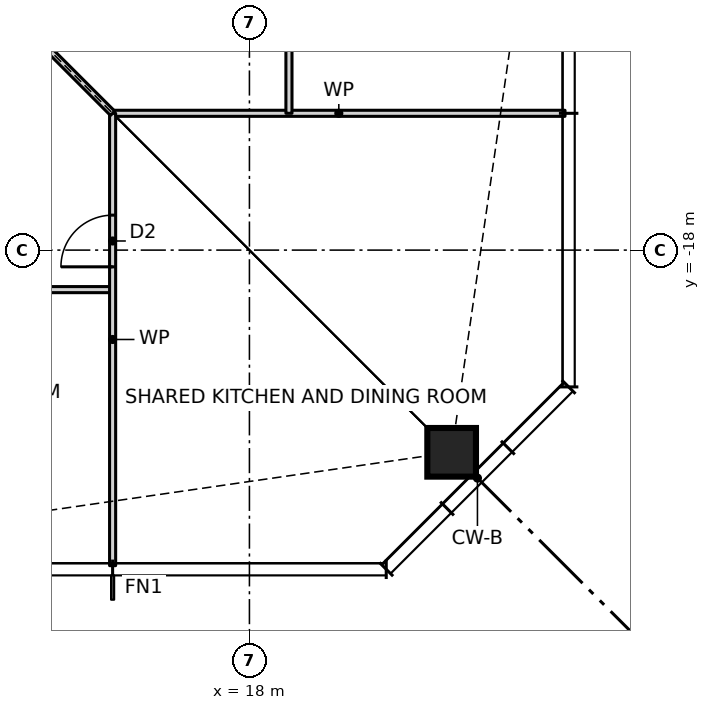
"""IFC4 building model, lengths in metres.
Left out: names, types, materials, properties, quantities, classifications, styles, units other than length and angle.
Written with IfcOpenShell. Run it as: python <this file> out.ifc"""

import sys

from ifc_helpers import new_model, si_unit, direction, frame, frame_2d, origin, origin_2d, place, context, subcontext, project, spatial, rectangle, hollow_rectangle, extrude, element, fill, save


model = new_model("IFC4")
c1 = context("Model", 3, precision=1e-05, world=origin(), true_north=direction((0.0, 1.0)))
c2 = subcontext(c1, "Body", "Model", "MODEL_VIEW")
j1 = project(units=[si_unit("LENGTHUNIT", "METRE"), si_unit("PLANEANGLEUNIT", "RADIAN")], contexts=[c1])
p1 = place(None, origin())
s1 = spatial("IfcSite", under=j1, at=p1, CompositionType="ELEMENT")
p2 = place(p1, origin())
s2 = spatial("IfcBuilding", under=s1, at=p2, CompositionType="ELEMENT")
p3 = place(p2, frame((0.0, 0.0, 67.5)))
s3 = spatial("IfcBuildingStorey", under=s2, at=p3, CompositionType="ELEMENT", Elevation=67.5)
p4 = place(p3, frame((21.326, -21.326, 0.0), z_axis=(0.0, 0.0, 1.0), x_axis=(1.0, 0.0, 0.0)))
e1 = element("IfcColumn", 1, at=p4, inside=s3, PredefinedType="COLUMN", context=c2, shape_type="SweptSolid", body=[
    extrude(hollow_rectangle(XDim=0.8, YDim=0.8, WallThickness=0.09, at=origin_2d()), origin(), (0.0, 0.0, 1.0), 3.5),
])
p5 = place(p3, frame((-15.75, -18.65, 0.0), z_axis=(0.0, 0.0, 1.0), x_axis=(1.0, 0.0, 0.0)))
e2 = element("IfcWall", 2, at=p5, inside=s3, PredefinedType="PARTITIONING", context=c2, shape_type="SweptSolid", body=[
    extrude(rectangle(XDim=31.5, YDim=0.1, at=frame_2d((15.75, 0.0))), origin(), (0.0, 0.0, 1.0), 3.27),
])
p6 = place(p5, frame((1.8, 0.0, 0.0)))
e3 = element("IfcOpeningElement", 3, at=p6, cuts=e2, PredefinedType="OPENING", context=c2, shape_type="SweptSolid", body=[
    extrude(rectangle(XDim=0.9, YDim=2.1, at=frame_2d((0.45, 1.05))), frame((0.0, 0.06, 0.0), z_axis=(0.0, -1.0, 0.0), x_axis=(1.0, 0.0, 0.0)), (0.0, 0.0, 1.0), 0.12),
])
p7 = place(p5, frame((6.3, 0.0, 0.0)))
e4 = element("IfcOpeningElement", 4, at=p7, cuts=e2, PredefinedType="OPENING", context=c2, shape_type="SweptSolid", body=[
    extrude(rectangle(XDim=0.9, YDim=2.1, at=frame_2d((0.45, 1.05))), frame((0.0, 0.06, 0.0), z_axis=(0.0, -1.0, 0.0), x_axis=(1.0, 0.0, 0.0)), (0.0, 0.0, 1.0), 0.12),
])
p8 = place(p5, frame((10.8, 0.0, 0.0)))
e5 = element("IfcOpeningElement", 5, at=p8, cuts=e2, PredefinedType="OPENING", context=c2, shape_type="SweptSolid", body=[
    extrude(rectangle(XDim=0.9, YDim=2.1, at=frame_2d((0.45, 1.05))), frame((0.0, 0.06, 0.0), z_axis=(0.0, -1.0, 0.0), x_axis=(1.0, 0.0, 0.0)), (0.0, 0.0, 1.0), 0.12),
])
p9 = place(p5, frame((15.3, 0.0, 0.0)))
e6 = element("IfcOpeningElement", 6, at=p9, cuts=e2, PredefinedType="OPENING", context=c2, shape_type="SweptSolid", body=[
    extrude(rectangle(XDim=0.9, YDim=2.1, at=frame_2d((0.45, 1.05))), frame((0.0, 0.06, 0.0), z_axis=(0.0, -1.0, 0.0), x_axis=(1.0, 0.0, 0.0)), (0.0, 0.0, 1.0), 0.12),
])
p10 = place(p5, frame((19.8, 0.0, 0.0)))
e7 = element("IfcOpeningElement", 7, at=p10, cuts=e2, PredefinedType="OPENING", context=c2, shape_type="SweptSolid", body=[
    extrude(rectangle(XDim=0.9, YDim=2.1, at=frame_2d((0.45, 1.05))), frame((0.0, 0.06, 0.0), z_axis=(0.0, -1.0, 0.0), x_axis=(1.0, 0.0, 0.0)), (0.0, 0.0, 1.0), 0.12),
])
p11 = place(p5, frame((24.3, 0.0, 0.0)))
e8 = element("IfcOpeningElement", 8, at=p11, cuts=e2, PredefinedType="OPENING", context=c2, shape_type="SweptSolid", body=[
    extrude(rectangle(XDim=0.9, YDim=2.1, at=frame_2d((0.45, 1.05))), frame((0.0, 0.06, 0.0), z_axis=(0.0, -1.0, 0.0), x_axis=(1.0, 0.0, 0.0)), (0.0, 0.0, 1.0), 0.12),
])
p12 = place(p5, frame((28.8, 0.0, 0.0)))
e9 = element("IfcOpeningElement", 9, at=p12, cuts=e2, PredefinedType="OPENING", context=c2, shape_type="SweptSolid", body=[
    extrude(rectangle(XDim=0.9, YDim=2.1, at=frame_2d((0.45, 1.05))), frame((0.0, 0.06, 0.0), z_axis=(0.0, -1.0, 0.0), x_axis=(1.0, 0.0, 0.0)), (0.0, 0.0, 1.0), 0.12),
])
p13 = place(p3, frame((15.75, -15.75, 0.0), z_axis=(0.0, 0.0, 1.0), x_axis=(1.0, 0.0, 0.0)))
e10 = element("IfcWall", 10, at=p13, inside=s3, PredefinedType="PARTITIONING", context=c2, shape_type="SweptSolid", body=[
    extrude(rectangle(XDim=7.44, YDim=0.1, at=frame_2d((3.72, 0.0))), origin(), (0.0, 0.0, 1.0), 3.27),
])
p14 = place(p3, frame((18.65, -15.75, 0.0), z_axis=(0.0, 0.0, 1.0), x_axis=(0.0, 1.0, 0.0)))
e11 = element("IfcWall", 11, at=p14, inside=s3, PredefinedType="PARTITIONING", context=c2, shape_type="SweptSolid", body=[
    extrude(rectangle(XDim=27.0, YDim=0.1, at=frame_2d((13.5, 0.0))), origin(), (0.0, 0.0, 1.0), 3.27),
])
p15 = place(p14, frame((1.8, 0.0, 0.0)))
e12 = element("IfcOpeningElement", 12, at=p15, cuts=e11, PredefinedType="OPENING", context=c2, shape_type="SweptSolid", body=[
    extrude(rectangle(XDim=0.9, YDim=2.1, at=frame_2d((0.45, 1.05))), frame((0.0, 0.06, 0.0), z_axis=(0.0, -1.0, 0.0), x_axis=(1.0, 0.0, 0.0)), (0.0, 0.0, 1.0), 0.12),
])
p16 = place(p14, frame((6.3, 0.0, 0.0)))
e13 = element("IfcOpeningElement", 13, at=p16, cuts=e11, PredefinedType="OPENING", context=c2, shape_type="SweptSolid", body=[
    extrude(rectangle(XDim=0.9, YDim=2.1, at=frame_2d((0.45, 1.05))), frame((0.0, 0.06, 0.0), z_axis=(0.0, -1.0, 0.0), x_axis=(1.0, 0.0, 0.0)), (0.0, 0.0, 1.0), 0.12),
])
p17 = place(p14, frame((10.8, 0.0, 0.0)))
e14 = element("IfcOpeningElement", 14, at=p17, cuts=e11, PredefinedType="OPENING", context=c2, shape_type="SweptSolid", body=[
    extrude(rectangle(XDim=0.9, YDim=2.1, at=frame_2d((0.45, 1.05))), frame((0.0, 0.06, 0.0), z_axis=(0.0, -1.0, 0.0), x_axis=(1.0, 0.0, 0.0)), (0.0, 0.0, 1.0), 0.12),
])
p18 = place(p14, frame((15.3, 0.0, 0.0)))
e15 = element("IfcOpeningElement", 15, at=p18, cuts=e11, PredefinedType="OPENING", context=c2, shape_type="SweptSolid", body=[
    extrude(rectangle(XDim=0.9, YDim=2.1, at=frame_2d((0.45, 1.05))), frame((0.0, 0.06, 0.0), z_axis=(0.0, -1.0, 0.0), x_axis=(1.0, 0.0, 0.0)), (0.0, 0.0, 1.0), 0.12),
])
p19 = place(p14, frame((19.8, 0.0, 0.0)))
e16 = element("IfcOpeningElement", 16, at=p19, cuts=e11, PredefinedType="OPENING", context=c2, shape_type="SweptSolid", body=[
    extrude(rectangle(XDim=0.9, YDim=2.1, at=frame_2d((0.45, 1.05))), frame((0.0, 0.06, 0.0), z_axis=(0.0, -1.0, 0.0), x_axis=(1.0, 0.0, 0.0)), (0.0, 0.0, 1.0), 0.12),
])
p20 = place(p14, frame((24.3, 0.0, 0.0)))
e17 = element("IfcOpeningElement", 17, at=p20, cuts=e11, PredefinedType="OPENING", context=c2, shape_type="SweptSolid", body=[
    extrude(rectangle(XDim=0.9, YDim=2.1, at=frame_2d((0.45, 1.05))), frame((0.0, 0.06, 0.0), z_axis=(0.0, -1.0, 0.0), x_axis=(1.0, 0.0, 0.0)), (0.0, 0.0, 1.0), 0.12),
])
p21 = place(p3, frame((15.75, -23.19, 0.0), z_axis=(0.0, 0.0, 1.0), x_axis=(0.0, 1.0, 0.0)))
e18 = element("IfcWall", 18, at=p21, inside=s3, PredefinedType="PARTITIONING", context=c2, shape_type="SweptSolid", body=[
    extrude(rectangle(XDim=7.44, YDim=0.1, at=frame_2d((3.72, 0.0))), origin(), (0.0, 0.0, 1.0), 3.27),
])
p22 = place(p21, frame((4.915, 0.0, 0.0)))
e19 = element("IfcOpeningElement", 19, at=p22, cuts=e18, PredefinedType="OPENING", context=c2, shape_type="SweptSolid", body=[
    extrude(rectangle(XDim=0.85, YDim=2.1, at=frame_2d((0.425, 1.05))), frame((0.0, 0.06, 0.0), z_axis=(0.0, -1.0, 0.0), x_axis=(1.0, 0.0, 0.0)), (0.0, 0.0, 1.0), 0.12),
])
p23 = place(p3, frame((15.75, -15.75, 0.0), z_axis=(0.0, 0.0, 1.0), x_axis=(-0.707106781187, 0.707106781187, 0.0)))
e20 = element("IfcWall", 20, at=p23, inside=s3, PredefinedType="PARTITIONING", context=c2, shape_type="SweptSolid", body=[
    extrude(rectangle(XDim=5.869, YDim=0.1, at=frame_2d((2.935, 0.0))), origin(), (0.0, 0.0, 1.0), 2.343),
])
p24 = place(p22, origin())
e21 = element("IfcDoor", 21, at=p24, inside=s3, OperationType="SINGLE_SWING_LEFT", PredefinedType="DOOR", context=c2, shape_type="SweptSolid", body=[
    extrude(rectangle(XDim=0.85, YDim=2.1, at=frame_2d((0.425, 1.05))), frame((0.0, 0.025, 0.0), z_axis=(0.0, -1.0, 0.0), x_axis=(1.0, 0.0, 0.0)), (0.0, 0.0, 1.0), 0.05),
])
fill(e19, e21)
save(model, sys.argv[1])
